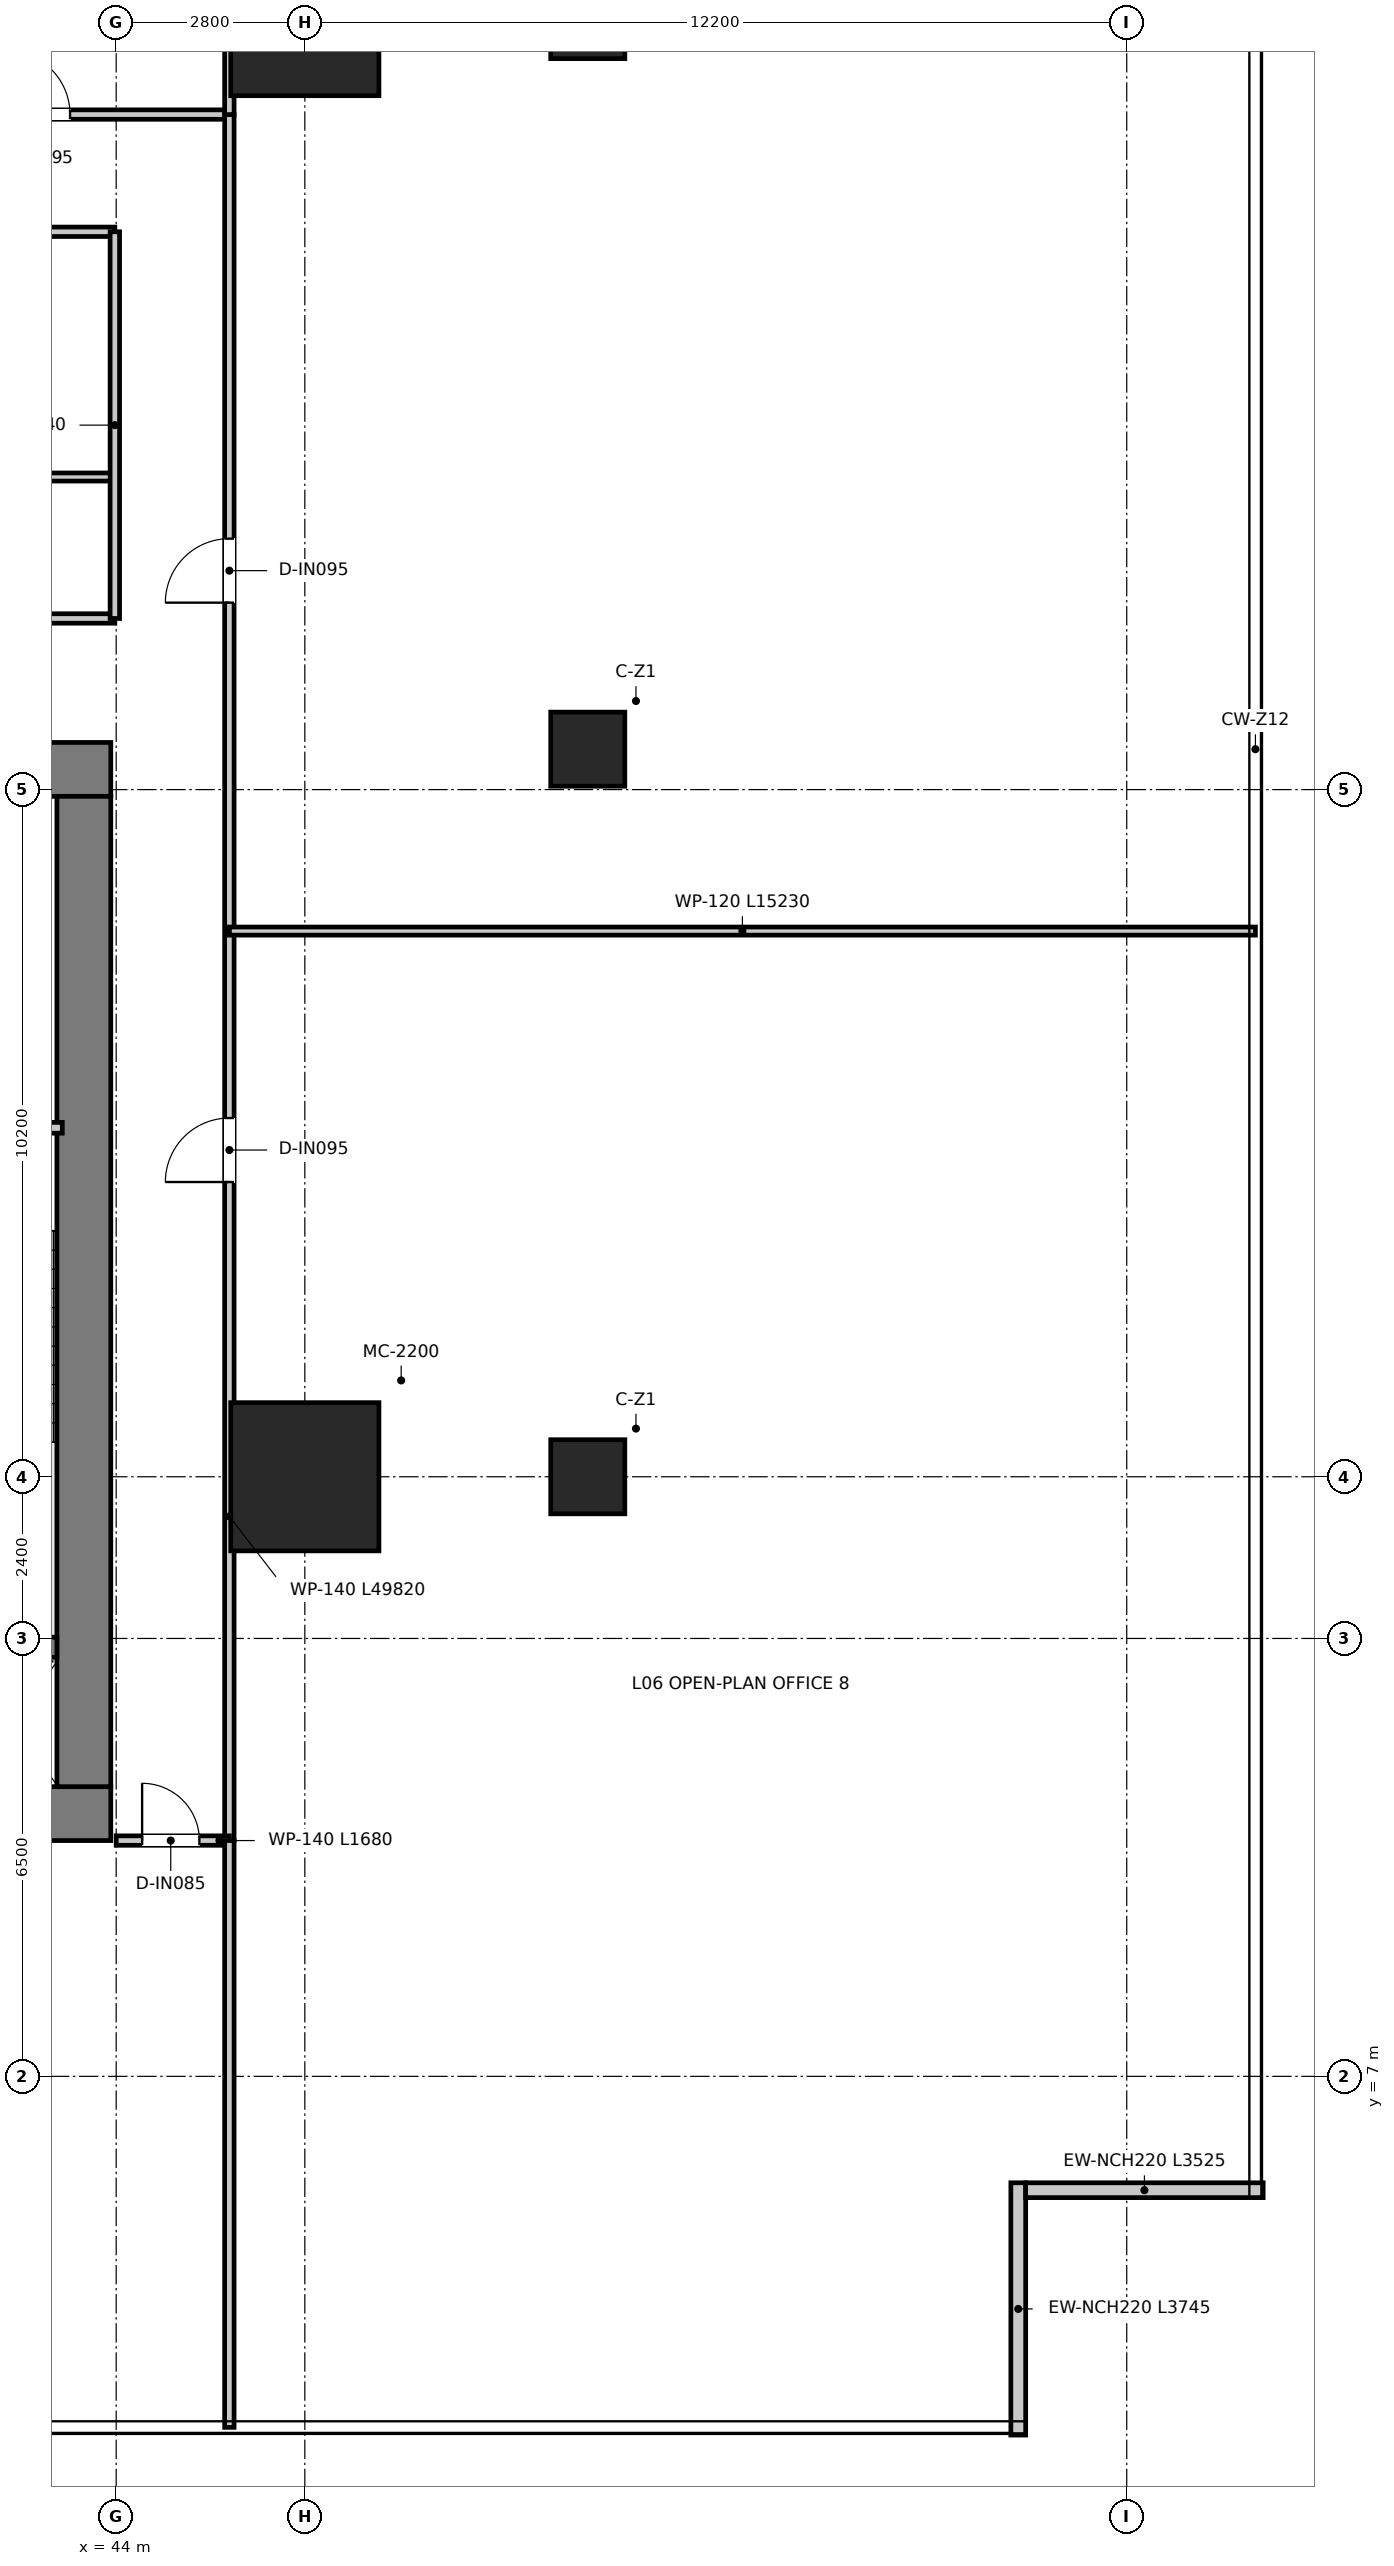
"""IFC4 building model, lengths in metres.
Left out: names, types, materials, properties, quantities, classifications, styles, units other than length and angle.
Written with IfcOpenShell. Run it as: python <this file> out.ifc"""

import sys

from ifc_helpers import new_model, si_unit, direction, frame, frame_2d, origin, origin_2d, place, context, subcontext, project, spatial, rectangle, extrude, source, transform, mapped, element, fill, save


model = new_model("IFC4")
c1 = context("Model", 3, precision=1e-05, world=origin(), true_north=direction((0.0, 1.0)))
c2 = subcontext(c1, "Body", "Model", "MODEL_VIEW")
j1 = project(units=[si_unit("LENGTHUNIT", "METRE"), si_unit("PLANEANGLEUNIT", "RADIAN")], contexts=[c1])
p1 = place(None, origin())
s1 = spatial("IfcSite", under=j1, at=p1, CompositionType="ELEMENT")
p2 = place(p1, origin())
s2 = spatial("IfcBuilding", under=s1, at=p2, CompositionType="ELEMENT")
p3 = place(p2, frame((0.0, 0.0, 28.95)))
s3 = spatial("IfcBuildingStorey", under=s2, at=p3, CompositionType="ELEMENT", Elevation=28.95)
p4 = place(p3, frame((28.08, 10.9, 0.0), z_axis=(0.0, 0.0, 1.0), x_axis=(1.0, 0.0, 0.0)))
e1 = element("IfcWall", 1, at=p4, inside=s3, PredefinedType="SHEAR", context=c2, shape_type="SweptSolid", body=[
    extrude(rectangle(XDim=15.84, YDim=0.8, at=frame_2d((7.92, 0.0))), origin(), (0.0, 0.0, 1.0), 3.95),
])
p5 = place(p3, frame((28.08, 26.4, 0.0), z_axis=(0.0, 0.0, 1.0), x_axis=(1.0, 0.0, 0.0)))
e2 = element("IfcWall", 2, at=p5, inside=s3, PredefinedType="SHEAR", context=c2, shape_type="SweptSolid", body=[
    extrude(rectangle(XDim=15.84, YDim=0.8, at=frame_2d((7.92, 0.0))), origin(), (0.0, 0.0, 1.0), 3.95),
])
p6 = place(p5, frame((7.22, 0.0, 0.0)))
e3 = element("IfcOpeningElement", 3, at=p6, cuts=e2, PredefinedType="OPENING", context=c2, shape_type="SweptSolid", body=[
    extrude(rectangle(XDim=1.4, YDim=2.2, at=frame_2d((0.7, 1.1))), frame((0.0, 0.41, 0.0), z_axis=(0.0, -1.0, 0.0), x_axis=(1.0, 0.0, 0.0)), (0.0, 0.0, 1.0), 0.82),
])
p7 = place(p5, frame((1.775, 0.0, 0.0)))
e4 = element("IfcOpeningElement", 4, at=p7, cuts=e2, PredefinedType="OPENING", context=c2, shape_type="SweptSolid", body=[
    extrude(rectangle(XDim=1.05, YDim=2.1, at=frame_2d((0.525, 1.05))), frame((0.0, 0.41, 0.0), z_axis=(0.0, -1.0, 0.0), x_axis=(1.0, 0.0, 0.0)), (0.0, 0.0, 1.0), 0.82),
])
p8 = place(p5, frame((13.015, 0.0, 0.0)))
e5 = element("IfcOpeningElement", 5, at=p8, cuts=e2, PredefinedType="OPENING", context=c2, shape_type="SweptSolid", body=[
    extrude(rectangle(XDim=1.05, YDim=2.1, at=frame_2d((0.525, 1.05))), frame((0.0, 0.41, 0.0), z_axis=(0.0, -1.0, 0.0), x_axis=(1.0, 0.0, 0.0)), (0.0, 0.0, 1.0), 0.82),
])
p9 = place(p3, frame((43.52, 11.3, 0.0), z_axis=(0.0, 0.0, 1.0), x_axis=(0.0, 1.0, 0.0)))
e6 = element("IfcWall", 6, at=p9, inside=s3, PredefinedType="SHEAR", context=c2, shape_type="SweptSolid", body=[
    extrude(rectangle(XDim=14.7, YDim=0.8, at=frame_2d((7.35, 0.0))), origin(), (0.0, 0.0, 1.0), 3.95),
])
p10 = place(p3, frame((40.02, 13.37, 0.0), z_axis=(0.0, 0.0, 1.0), x_axis=(1.0, 0.0, 0.0)))
e7 = element("IfcWall", 7, at=p10, inside=s3, PredefinedType="SHEAR", context=c2, shape_type="SweptSolid", body=[
    extrude(rectangle(XDim=3.1, YDim=0.3, at=frame_2d((1.55, 0.0))), origin(), (0.0, 0.0, 1.0), 3.95),
])
m1 = source(origin(), c2, "Body", "SweptSolid", [
    extrude(rectangle(XDim=2.2, YDim=2.2, at=origin_2d()), origin(), (0.0, 0.0, 1.0), 3.95),
])
for number, where, z_axis, x_axis in (
    (8, (46.8, 15.9, 0.0), (0.0, 0.0, 1.0), (1.0, 0.0, 0.0)),
    (9, (46.8, 37.5, 0.0), (0.0, 0.0, 1.0), (1.0, 0.0, 0.0)),
):
    element("IfcColumn", number, at=place(p3, frame(where, z_axis=z_axis, x_axis=x_axis)), inside=s3, PredefinedType="USERDEFINED", context=c2, shape_type="MappedRepresentation", body=[
        mapped(m1, transform((0.0, 0.0, 0.0), x_axis=(1.0, 0.0, 0.0), y_axis=(0.0, 1.0, 0.0), z_axis=(0.0, 0.0, 1.0), scale=1.0)),
    ])
m2 = source(origin(), c2, "Body", "SweptSolid", [
    extrude(rectangle(XDim=1.1, YDim=1.1, at=origin_2d()), origin(), (0.0, 0.0, 1.0), 3.95),
])
for number, where, z_axis, x_axis in (
    (10, (51.0, 37.5, 0.0), (0.0, 0.0, 1.0), (1.0, 0.0, 0.0)),
    (11, (51.0, 26.7, 0.0), (0.0, 0.0, 1.0), (1.0, 0.0, 0.0)),
    (12, (51.0, 15.9, 0.0), (0.0, 0.0, 1.0), (1.0, 0.0, 0.0)),
):
    element("IfcColumn", number, at=place(p3, frame(where, z_axis=z_axis, x_axis=x_axis)), inside=s3, PredefinedType="COLUMN", context=c2, shape_type="MappedRepresentation", body=[
        mapped(m2, transform((0.0, 0.0, 0.0), x_axis=(1.0, 0.0, 0.0), y_axis=(0.0, 1.0, 0.0), z_axis=(0.0, 0.0, 1.0), scale=1.0)),
    ])
p11 = place(p3, frame((57.39, 1.675, 0.0), z_axis=(0.0, 0.0, 1.0), x_axis=(0.0, 1.0, 0.0)))
e13 = element("IfcWall", 13, at=p11, inside=s3, PredefinedType="ELEMENTEDWALL", context=c2, shape_type="SweptSolid", body=[
    extrude(rectangle(XDim=3.745, YDim=0.22, at=frame_2d((1.873, 0.0))), origin(), (0.0, 0.0, 1.0), 3.67),
])
p12 = place(p3, frame((57.5, 5.31, 0.0), z_axis=(0.0, 0.0, 1.0), x_axis=(1.0, 0.0, 0.0)))
e14 = element("IfcWall", 14, at=p12, inside=s3, PredefinedType="ELEMENTEDWALL", context=c2, shape_type="SweptSolid", body=[
    extrude(rectangle(XDim=3.525, YDim=0.22, at=frame_2d((1.762, 0.0))), origin(), (0.0, 0.0, 1.0), 3.67),
])
p13 = place(p3, frame((40.04, 21.08, 0.0), z_axis=(0.0, 0.0, 1.0), x_axis=(1.0, 0.0, 0.0)))
e15 = element("IfcWall", 15, at=p13, inside=s3, PredefinedType="PARTITIONING", context=c2, shape_type="SweptSolid", body=[
    extrude(rectangle(XDim=3.16, YDim=0.16, at=frame_2d((1.58, 0.0))), origin(), (0.0, 0.0, 1.0), 3.67),
])
p14 = place(p13, frame((1.055, 0.0, 0.0)))
e16 = element("IfcOpeningElement", 16, at=p14, cuts=e15, PredefinedType="OPENING", context=c2, shape_type="SweptSolid", body=[
    extrude(rectangle(XDim=1.05, YDim=2.1, at=frame_2d((0.525, 1.05))), frame((0.0, 0.09, 0.0), z_axis=(0.0, -1.0, 0.0), x_axis=(1.0, 0.0, 0.0)), (0.0, 0.0, 1.0), 0.18),
])
p15 = place(p3, frame((28.02, 28.64, 0.0), z_axis=(0.0, 0.0, 1.0), x_axis=(1.0, 0.0, 0.0)))
e17 = element("IfcWall", 17, at=p15, inside=s3, PredefinedType="PARTITIONING", context=c2, shape_type="SweptSolid", body=[
    extrude(rectangle(XDim=15.96, YDim=0.14, at=frame_2d((7.98, 0.0))), origin(), (0.0, 0.0, 1.0), 3.08),
])
p16 = place(p15, frame((7.455, 0.0, 0.0)))
e18 = element("IfcOpeningElement", 18, at=p16, cuts=e17, PredefinedType="OPENING", context=c2, shape_type="SweptSolid", body=[
    extrude(rectangle(XDim=1.05, YDim=2.15, at=frame_2d((0.525, 1.075))), frame((0.0, 0.08, 0.0), z_axis=(0.0, -1.0, 0.0), x_axis=(1.0, 0.0, 0.0)), (0.0, 0.0, 1.0), 0.16),
])
p17 = place(p3, frame((28.02, 30.74, 0.0), z_axis=(0.0, 0.0, 1.0), x_axis=(1.0, 0.0, 0.0)))
e19 = element("IfcWall", 19, at=p17, inside=s3, PredefinedType="PARTITIONING", context=c2, shape_type="SweptSolid", body=[
    extrude(rectangle(XDim=15.96, YDim=0.12, at=frame_2d((7.98, 0.0))), origin(), (0.0, 0.0, 1.0), 3.08),
])
p18 = place(p3, frame((28.02, 34.38, 0.0), z_axis=(0.0, 0.0, 1.0), x_axis=(1.0, 0.0, 0.0)))
e20 = element("IfcWall", 20, at=p18, inside=s3, PredefinedType="PARTITIONING", context=c2, shape_type="SweptSolid", body=[
    extrude(rectangle(XDim=15.96, YDim=0.14, at=frame_2d((7.98, 0.0))), origin(), (0.0, 0.0, 1.0), 3.08),
])
p19 = place(p18, frame((1.13, 0.0, 0.0)))
e21 = element("IfcOpeningElement", 21, at=p19, cuts=e20, PredefinedType="OPENING", context=c2, shape_type="SweptSolid", body=[
    extrude(rectangle(XDim=0.9, YDim=2.1, at=frame_2d((0.45, 1.05))), frame((0.0, 0.08, 0.0), z_axis=(0.0, -1.0, 0.0), x_axis=(1.0, 0.0, 0.0)), (0.0, 0.0, 1.0), 0.16),
])
p20 = place(p18, frame((4.33, 0.0, 0.0)))
e22 = element("IfcOpeningElement", 22, at=p20, cuts=e20, PredefinedType="OPENING", context=c2, shape_type="SweptSolid", body=[
    extrude(rectangle(XDim=0.9, YDim=2.1, at=frame_2d((0.45, 1.05))), frame((0.0, 0.08, 0.0), z_axis=(0.0, -1.0, 0.0), x_axis=(1.0, 0.0, 0.0)), (0.0, 0.0, 1.0), 0.16),
])
p21 = place(p18, frame((7.355, 0.0, 0.0)))
e23 = element("IfcOpeningElement", 23, at=p21, cuts=e20, PredefinedType="OPENING", context=c2, shape_type="SweptSolid", body=[
    extrude(rectangle(XDim=0.95, YDim=2.1, at=frame_2d((0.475, 1.05))), frame((0.0, 0.08, 0.0), z_axis=(0.0, -1.0, 0.0), x_axis=(1.0, 0.0, 0.0)), (0.0, 0.0, 1.0), 0.16),
])
p22 = place(p18, frame((12.23, 0.0, 0.0)))
e24 = element("IfcOpeningElement", 24, at=p22, cuts=e20, PredefinedType="OPENING", context=c2, shape_type="SweptSolid", body=[
    extrude(rectangle(XDim=0.95, YDim=2.1, at=frame_2d((0.475, 1.05))), frame((0.0, 0.08, 0.0), z_axis=(0.0, -1.0, 0.0), x_axis=(1.0, 0.0, 0.0)), (0.0, 0.0, 1.0), 0.16),
])
p23 = place(p3, frame((43.98, 28.64, 0.0), z_axis=(0.0, 0.0, 1.0), x_axis=(0.0, 1.0, 0.0)))
e25 = element("IfcWall", 25, at=p23, inside=s3, PredefinedType="PARTITIONING", context=c2, shape_type="SweptSolid", body=[
    extrude(rectangle(XDim=5.74, YDim=0.14, at=frame_2d((2.87, 0.0))), origin(), (0.0, 0.0, 1.0), 3.22),
])
p24 = place(p3, frame((26.32, 36.12, 0.0), z_axis=(0.0, 0.0, 1.0), x_axis=(1.0, 0.0, 0.0)))
e26 = element("IfcWall", 26, at=p24, inside=s3, PredefinedType="PARTITIONING", context=c2, shape_type="SweptSolid", body=[
    extrude(rectangle(XDim=19.36, YDim=0.14, at=frame_2d((9.68, 0.0))), origin(), (0.0, 0.0, 1.0), 3.08),
])
p25 = place(p24, frame((2.365, 0.0, 0.0)))
e27 = element("IfcOpeningElement", 27, at=p25, cuts=e26, PredefinedType="OPENING", context=c2, shape_type="SweptSolid", body=[
    extrude(rectangle(XDim=0.95, YDim=2.1, at=frame_2d((0.475, 1.05))), frame((0.0, 0.08, 0.0), z_axis=(0.0, -1.0, 0.0), x_axis=(1.0, 0.0, 0.0)), (0.0, 0.0, 1.0), 0.16),
])
p26 = place(p24, frame((9.205, 0.0, 0.0)))
e28 = element("IfcOpeningElement", 28, at=p26, cuts=e26, PredefinedType="OPENING", context=c2, shape_type="SweptSolid", body=[
    extrude(rectangle(XDim=0.95, YDim=2.1, at=frame_2d((0.475, 1.05))), frame((0.0, 0.08, 0.0), z_axis=(0.0, -1.0, 0.0), x_axis=(1.0, 0.0, 0.0)), (0.0, 0.0, 1.0), 0.16),
])
p27 = place(p24, frame((16.045, 0.0, 0.0)))
e29 = element("IfcOpeningElement", 29, at=p27, cuts=e26, PredefinedType="OPENING", context=c2, shape_type="SweptSolid", body=[
    extrude(rectangle(XDim=0.95, YDim=2.1, at=frame_2d((0.475, 1.05))), frame((0.0, 0.08, 0.0), z_axis=(0.0, -1.0, 0.0), x_axis=(1.0, 0.0, 0.0)), (0.0, 0.0, 1.0), 0.16),
])
p28 = place(p3, frame((45.68, 10.5, 0.0), z_axis=(0.0, 0.0, 1.0), x_axis=(0.0, 1.0, 0.0)))
e30 = element("IfcWall", 30, at=p28, inside=s3, PredefinedType="PARTITIONING", context=c2, shape_type="SweptSolid", body=[
    extrude(rectangle(XDim=25.62, YDim=0.14, at=frame_2d((12.81, 0.0))), origin(), (0.0, 0.0, 1.0), 2.97),
])
p29 = place(p28, frame((9.775, 0.0, 0.0)))
e31 = element("IfcOpeningElement", 31, at=p29, cuts=e30, PredefinedType="OPENING", context=c2, shape_type="SweptSolid", body=[
    extrude(rectangle(XDim=0.95, YDim=2.1, at=frame_2d((0.475, 1.05))), frame((0.0, 0.08, 0.0), z_axis=(0.0, -1.0, 0.0), x_axis=(1.0, 0.0, 0.0)), (0.0, 0.0, 1.0), 0.16),
])
p30 = place(p28, frame((18.375, 0.0, 0.0)))
e32 = element("IfcOpeningElement", 32, at=p30, cuts=e30, PredefinedType="OPENING", context=c2, shape_type="SweptSolid", body=[
    extrude(rectangle(XDim=0.95, YDim=2.1, at=frame_2d((0.475, 1.05))), frame((0.0, 0.08, 0.0), z_axis=(0.0, -1.0, 0.0), x_axis=(1.0, 0.0, 0.0)), (0.0, 0.0, 1.0), 0.16),
])
p31 = place(p3, frame((44.0, 10.5, 0.0), z_axis=(0.0, 0.0, 1.0), x_axis=(1.0, 0.0, 0.0)))
e33 = element("IfcWall", 33, at=p31, inside=s3, PredefinedType="PARTITIONING", context=c2, shape_type="SweptSolid", body=[
    extrude(rectangle(XDim=1.68, YDim=0.14, at=frame_2d((0.84, 0.0))), origin(), (0.0, 0.0, 1.0), 3.67),
])
p32 = place(p31, frame((0.385, 0.0, 0.0)))
e34 = element("IfcOpeningElement", 34, at=p32, cuts=e33, PredefinedType="OPENING", context=c2, shape_type="SweptSolid", body=[
    extrude(rectangle(XDim=0.85, YDim=2.1, at=frame_2d((0.425, 1.05))), frame((0.0, 0.08, 0.0), z_axis=(0.0, -1.0, 0.0), x_axis=(1.0, 0.0, 0.0)), (0.0, 0.0, 1.0), 0.16),
])
p33 = place(p3, frame((45.68, 36.12, 0.0), z_axis=(0.0, 0.0, 1.0), x_axis=(0.0, 1.0, 0.0)))
e35 = element("IfcWall", 35, at=p33, inside=s3, PredefinedType="PARTITIONING", context=c2, shape_type="SweptSolid", body=[
    extrude(rectangle(XDim=15.49, YDim=0.14, at=frame_2d((7.745, 0.0))), origin(), (0.0, 0.0, 1.0), 2.97),
])
p34 = place(p3, frame((45.68, 1.79, 0.0), z_axis=(0.0, 0.0, 1.0), x_axis=(0.0, 1.0, 0.0)))
e36 = element("IfcWall", 36, at=p34, inside=s3, PredefinedType="PARTITIONING", context=c2, shape_type="SweptSolid", body=[
    extrude(rectangle(XDim=8.71, YDim=0.14, at=frame_2d((4.355, 0.0))), origin(), (0.0, 0.0, 1.0), 3.67),
])
p35 = place(p3, frame((45.68, 24.0, 0.0), z_axis=(0.0, 0.0, 1.0), x_axis=(1.0, 0.0, 0.0)))
e37 = element("IfcWall", 37, at=p35, inside=s3, PredefinedType="PARTITIONING", context=c2, shape_type="SweptSolid", body=[
    extrude(rectangle(XDim=15.23, YDim=0.12, at=frame_2d((7.615, 0.0))), origin(), (0.0, 0.0, 1.0), 2.97),
])
p36 = place(p27, origin())
e38 = element("IfcDoor", 38, at=p36, inside=s3, OperationType="SINGLE_SWING_LEFT", PredefinedType="DOOR", context=c2, shape_type="SweptSolid", body=[
    extrude(rectangle(XDim=0.95, YDim=2.1, at=frame_2d((0.475, 1.05))), frame((0.0, 0.025, 0.0), z_axis=(0.0, -1.0, 0.0), x_axis=(1.0, 0.0, 0.0)), (0.0, 0.0, 1.0), 0.05),
])
fill(e29, e38)
p37 = place(p29, origin())
e39 = element("IfcDoor", 39, at=p37, inside=s3, OperationType="SINGLE_SWING_LEFT", PredefinedType="DOOR", context=c2, shape_type="SweptSolid", body=[
    extrude(rectangle(XDim=0.95, YDim=2.1, at=frame_2d((0.475, 1.05))), frame((0.0, 0.025, 0.0), z_axis=(0.0, -1.0, 0.0), x_axis=(1.0, 0.0, 0.0)), (0.0, 0.0, 1.0), 0.05),
])
fill(e31, e39)
p38 = place(p30, origin())
e40 = element("IfcDoor", 40, at=p38, inside=s3, OperationType="SINGLE_SWING_LEFT", PredefinedType="DOOR", context=c2, shape_type="SweptSolid", body=[
    extrude(rectangle(XDim=0.95, YDim=2.1, at=frame_2d((0.475, 1.05))), frame((0.0, 0.025, 0.0), z_axis=(0.0, -1.0, 0.0), x_axis=(1.0, 0.0, 0.0)), (0.0, 0.0, 1.0), 0.05),
])
fill(e32, e40)
p39 = place(p32, origin())
e41 = element("IfcDoor", 41, at=p39, inside=s3, OperationType="SINGLE_SWING_LEFT", PredefinedType="DOOR", context=c2, shape_type="SweptSolid", body=[
    extrude(rectangle(XDim=0.85, YDim=2.1, at=frame_2d((0.425, 1.05))), frame((0.0, 0.025, 0.0), z_axis=(0.0, -1.0, 0.0), x_axis=(1.0, 0.0, 0.0)), (0.0, 0.0, 1.0), 0.05),
])
fill(e34, e41)
save(model, sys.argv[1])
